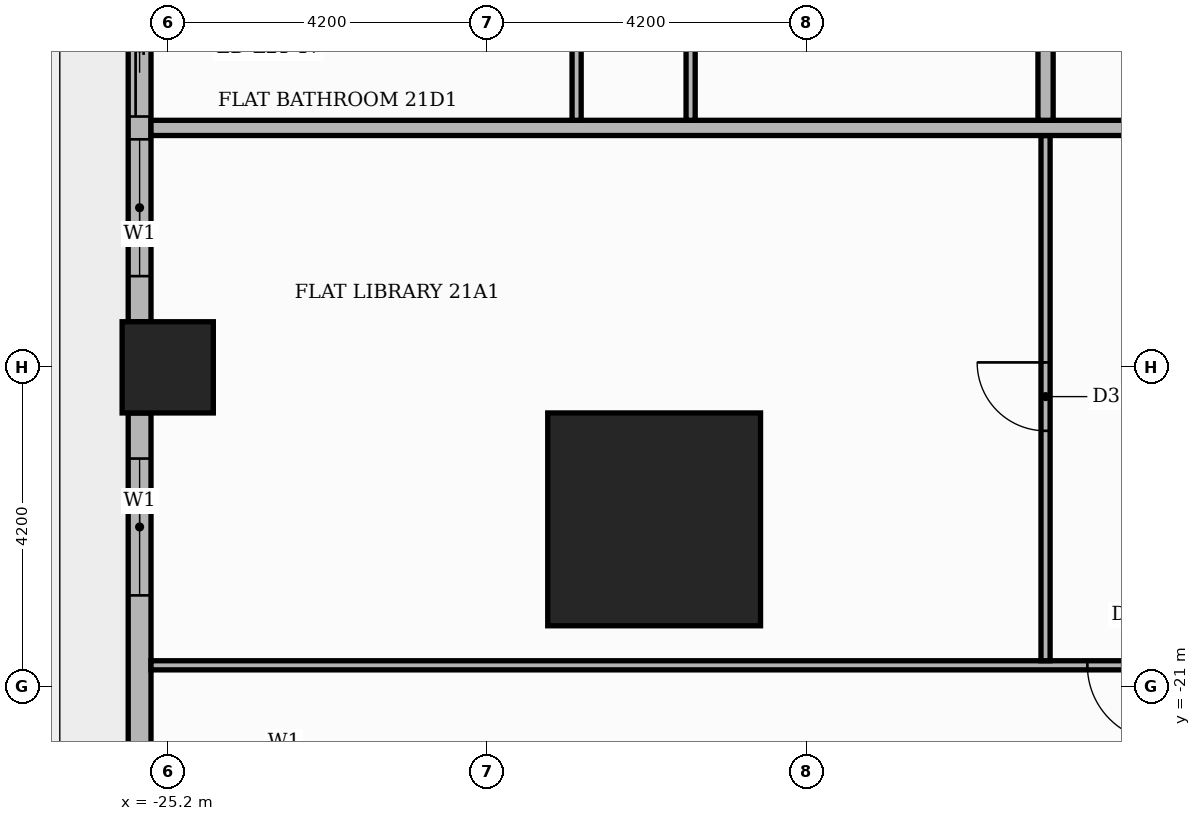
"""IFC4 building model, lengths in metres.
Left out: names, types, materials, properties, quantities, classifications, styles, units other than length and angle.
Written with IfcOpenShell. Run it as: python <this file> out.ifc"""

import sys

from ifc_helpers import new_model, si_unit, direction, frame, frame_2d, origin, origin_2d, place, context, subcontext, project, spatial, rectangle, extrude, element, fill, save


model = new_model("IFC4")
c1 = context("Model", 3, precision=1e-05, world=origin(), true_north=direction((0.0, 1.0)))
c2 = subcontext(c1, "Body", "Model", "MODEL_VIEW")
j1 = project(units=[si_unit("LENGTHUNIT", "METRE"), si_unit("PLANEANGLEUNIT", "RADIAN")], contexts=[c1])
p1 = place(None, origin())
s1 = spatial("IfcSite", under=j1, at=p1, CompositionType="ELEMENT")
p2 = place(p1, origin())
s2 = spatial("IfcBuilding", under=s1, at=p2, CompositionType="ELEMENT")
p3 = place(p2, frame((0.0, 0.0, 90.9)))
s3 = spatial("IfcBuildingStorey", under=s2, at=p3, CompositionType="ELEMENT", Elevation=90.9)
p4 = place(p3, frame((-18.8, -18.8, 0.0), z_axis=(0.0, 0.0, 1.0), x_axis=(1.0, 0.0, 0.0)))
e1 = element("IfcColumn", 1, at=p4, inside=s3, PredefinedType="COLUMN", context=c2, shape_type="SweptSolid", body=[
    extrude(rectangle(XDim=2.8, YDim=2.8, at=origin_2d()), origin(), (0.0, 0.0, 1.0), 3.9),
])
p5 = place(p3, frame((-25.2, -16.8, 0.0), z_axis=(0.0, 0.0, 1.0), x_axis=(1.0, 0.0, 0.0)))
e2 = element("IfcColumn", 2, at=p5, inside=s3, PredefinedType="COLUMN", context=c2, shape_type="SweptSolid", body=[
    extrude(rectangle(XDim=1.2, YDim=1.2, at=origin_2d()), origin(), (0.0, 0.0, 1.0), 3.9),
])
p6 = place(p3, frame((-25.57, -9.0, 0.0), z_axis=(0.0, 0.0, 1.0), x_axis=(0.0, -1.0, 0.0)))
e3 = element("IfcWall", 3, at=p6, inside=s3, PredefinedType="STANDARD", context=c2, shape_type="SweptSolid", body=[
    extrude(rectangle(XDim=7.2, YDim=0.3, at=frame_2d((3.6, 0.0))), origin(), (0.0, 0.0, 1.0), 3.48),
])
p7 = place(p6, frame((0.6, 0.0, 0.9)))
e4 = element("IfcOpeningElement", 4, at=p7, cuts=e3, PredefinedType="OPENING", context=c2, shape_type="SweptSolid", body=[
    extrude(rectangle(XDim=1.8, YDim=2.1, at=frame_2d((0.9, 1.05))), frame((0.0, 0.16, 0.0), z_axis=(0.0, -1.0, 0.0), x_axis=(1.0, 0.0, 0.0)), (0.0, 0.0, 1.0), 0.32),
])
p8 = place(p6, frame((2.7, 0.0, 0.0)))
e5 = element("IfcOpeningElement", 5, at=p8, cuts=e3, PredefinedType="OPENING", context=c2, shape_type="SweptSolid", body=[
    extrude(rectangle(XDim=1.8, YDim=2.4, at=frame_2d((0.9, 1.2))), frame((0.0, 0.16, 0.0), z_axis=(0.0, -1.0, 0.0), x_axis=(1.0, 0.0, 0.0)), (0.0, 0.0, 1.0), 0.32),
])
p9 = place(p6, frame((4.8, 0.0, 0.9)))
e6 = element("IfcOpeningElement", 6, at=p9, cuts=e3, PredefinedType="OPENING", context=c2, shape_type="SweptSolid", body=[
    extrude(rectangle(XDim=1.8, YDim=2.1, at=frame_2d((0.9, 1.05))), frame((0.0, 0.16, 0.0), z_axis=(0.0, -1.0, 0.0), x_axis=(1.0, 0.0, 0.0)), (0.0, 0.0, 1.0), 0.32),
])
p10 = place(p3, frame((-25.57, -17.4, 0.0), z_axis=(0.0, 0.0, 1.0), x_axis=(0.0, -1.0, 0.0)))
e7 = element("IfcWall", 7, at=p10, inside=s3, PredefinedType="STANDARD", context=c2, shape_type="SweptSolid", body=[
    extrude(rectangle(XDim=4.82, YDim=0.3, at=frame_2d((2.41, 0.0))), origin(), (0.0, 0.0, 1.0), 3.48),
])
p11 = place(p10, frame((0.6, 0.0, 0.9)))
e8 = element("IfcOpeningElement", 8, at=p11, cuts=e7, PredefinedType="OPENING", context=c2, shape_type="SweptSolid", body=[
    extrude(rectangle(XDim=1.8, YDim=2.1, at=frame_2d((0.9, 1.05))), frame((0.0, 0.16, 0.0), z_axis=(0.0, -1.0, 0.0), x_axis=(1.0, 0.0, 0.0)), (0.0, 0.0, 1.0), 0.32),
])
p12 = place(p3, frame((-25.42, -20.72, 0.0), z_axis=(0.0, 0.0, 1.0), x_axis=(1.0, 0.0, 0.0)))
e9 = element("IfcWall", 9, at=p12, inside=s3, PredefinedType="PARTITIONING", context=c2, shape_type="SweptSolid", body=[
    extrude(rectangle(XDim=38.97, YDim=0.12, at=frame_2d((19.485, 0.0))), origin(), (0.0, 0.0, 1.0), 3.48),
])
p13 = place(p12, frame((12.32, 0.0, 0.0)))
e10 = element("IfcOpeningElement", 10, at=p13, cuts=e9, PredefinedType="OPENING", context=c2, shape_type="SweptSolid", body=[
    extrude(rectangle(XDim=1.0, YDim=2.1, at=frame_2d((0.5, 1.05))), frame((0.0, 0.07, 0.0), z_axis=(0.0, -1.0, 0.0), x_axis=(1.0, 0.0, 0.0)), (0.0, 0.0, 1.0), 0.14),
])
p14 = place(p12, frame((16.52, 0.0, 0.0)))
e11 = element("IfcOpeningElement", 11, at=p14, cuts=e9, PredefinedType="OPENING", context=c2, shape_type="SweptSolid", body=[
    extrude(rectangle(XDim=1.0, YDim=2.1, at=frame_2d((0.5, 1.05))), frame((0.0, 0.07, 0.0), z_axis=(0.0, -1.0, 0.0), x_axis=(1.0, 0.0, 0.0)), (0.0, 0.0, 1.0), 0.14),
])
p15 = place(p12, frame((23.92, 0.0, 0.0)))
e12 = element("IfcOpeningElement", 12, at=p15, cuts=e9, PredefinedType="OPENING", context=c2, shape_type="SweptSolid", body=[
    extrude(rectangle(XDim=0.9, YDim=2.1, at=frame_2d((0.45, 1.05))), frame((0.0, 0.07, 0.0), z_axis=(0.0, -1.0, 0.0), x_axis=(1.0, 0.0, 0.0)), (0.0, 0.0, 1.0), 0.14),
])
p16 = place(p12, frame((34.42, 0.0, 0.0)))
e13 = element("IfcOpeningElement", 13, at=p16, cuts=e9, PredefinedType="OPENING", context=c2, shape_type="SweptSolid", body=[
    extrude(rectangle(XDim=0.9, YDim=2.1, at=frame_2d((0.45, 1.05))), frame((0.0, 0.07, 0.0), z_axis=(0.0, -1.0, 0.0), x_axis=(1.0, 0.0, 0.0)), (0.0, 0.0, 1.0), 0.14),
])
p17 = place(p3, frame((-13.65, -20.66, 0.0), z_axis=(0.0, 0.0, 1.0), x_axis=(0.0, 1.0, 0.0)))
e14 = element("IfcWall", 14, at=p17, inside=s3, PredefinedType="PARTITIONING", context=c2, shape_type="SweptSolid", body=[
    extrude(rectangle(XDim=6.91, YDim=0.12, at=frame_2d((3.455, 0.0))), origin(), (0.0, 0.0, 1.0), 3.48),
])
p18 = place(p17, frame((3.025, 0.0, 0.0)))
e15 = element("IfcOpeningElement", 15, at=p18, cuts=e14, PredefinedType="OPENING", context=c2, shape_type="SweptSolid", body=[
    extrude(rectangle(XDim=0.9, YDim=2.1, at=frame_2d((0.45, 1.05))), frame((0.0, 0.07, 0.0), z_axis=(0.0, -1.0, 0.0), x_axis=(1.0, 0.0, 0.0)), (0.0, 0.0, 1.0), 0.14),
])
p19 = place(p3, frame((-25.42, -13.65, 0.0), z_axis=(0.0, 0.0, 1.0), x_axis=(1.0, 0.0, 0.0)))
e16 = element("IfcWall", 16, at=p19, inside=s3, PredefinedType="PARTITIONING", context=c2, shape_type="SweptSolid", body=[
    extrude(rectangle(XDim=39.07, YDim=0.2, at=frame_2d((19.535, 0.0))), origin(), (0.0, 0.0, 1.0), 3.48),
])
p20 = place(p19, frame((14.37, 0.0, 0.0)))
e17 = element("IfcOpeningElement", 17, at=p20, cuts=e16, PredefinedType="OPENING", context=c2, shape_type="SweptSolid", body=[
    extrude(rectangle(XDim=1.1, YDim=2.4, at=frame_2d((0.55, 1.2))), frame((0.0, 0.11, 0.0), z_axis=(0.0, -1.0, 0.0), x_axis=(1.0, 0.0, 0.0)), (0.0, 0.0, 1.0), 0.22),
])
p21 = place(p3, frame((-19.82, -13.55, 0.0), z_axis=(0.0, 0.0, 1.0), x_axis=(0.0, 1.0, 0.0)))
e18 = element("IfcWall", 18, at=p21, inside=s3, PredefinedType="PARTITIONING", context=c2, shape_type="SweptSolid", body=[
    extrude(rectangle(XDim=1.94, YDim=0.12, at=frame_2d((0.97, 0.0))), origin(), (0.0, 0.0, 1.0), 3.48),
])
p22 = place(p3, frame((-18.32, -13.55, 0.0), z_axis=(0.0, 0.0, 1.0), x_axis=(0.0, 1.0, 0.0)))
e19 = element("IfcWall", 19, at=p22, inside=s3, PredefinedType="PARTITIONING", context=c2, shape_type="SweptSolid", body=[
    extrude(rectangle(XDim=4.34, YDim=0.12, at=frame_2d((2.17, 0.0))), origin(), (0.0, 0.0, 1.0), 3.48),
])
p23 = place(p22, frame((1.7, 0.0, 0.0)))
e20 = element("IfcOpeningElement", 20, at=p23, cuts=e19, PredefinedType="OPENING", context=c2, shape_type="SweptSolid", body=[
    extrude(rectangle(XDim=0.9, YDim=2.1, at=frame_2d((0.45, 1.05))), frame((0.0, 0.07, 0.0), z_axis=(0.0, -1.0, 0.0), x_axis=(1.0, 0.0, 0.0)), (0.0, 0.0, 1.0), 0.14),
])
p24 = place(p3, frame((-13.65, -13.55, 0.0), z_axis=(0.0, 0.0, 1.0), x_axis=(0.0, 1.0, 0.0)))
e21 = element("IfcWall", 21, at=p24, inside=s3, PredefinedType="PARTITIONING", context=c2, shape_type="SweptSolid", body=[
    extrude(rectangle(XDim=27.1, YDim=0.2, at=frame_2d((13.55, 0.0))), origin(), (0.0, 0.0, 1.0), 3.48),
])
p25 = place(p24, frame((24.55, 0.0, 0.0)))
e22 = element("IfcOpeningElement", 22, at=p25, cuts=e21, PredefinedType="OPENING", context=c2, shape_type="SweptSolid", body=[
    extrude(rectangle(XDim=1.1, YDim=2.4, at=frame_2d((0.55, 1.2))), frame((0.0, 0.11, 0.0), z_axis=(0.0, -1.0, 0.0), x_axis=(1.0, 0.0, 0.0)), (0.0, 0.0, 1.0), 0.22),
])
p26 = place(p8, origin())
e23 = element("IfcDoor", 23, at=p26, inside=s3, OperationType="SLIDING_TO_RIGHT", PredefinedType="DOOR", context=c2, shape_type="SweptSolid", body=[
    extrude(rectangle(XDim=1.8, YDim=2.4, at=frame_2d((0.9, 1.2))), frame((0.0, 0.025, 0.0), z_axis=(0.0, -1.0, 0.0), x_axis=(1.0, 0.0, 0.0)), (0.0, 0.0, 1.0), 0.05),
])
fill(e5, e23)
p27 = place(p9, origin())
e24 = element("IfcWindow", 24, at=p27, inside=s3, PartitioningType="SINGLE_PANEL", PredefinedType="WINDOW", context=c2, shape_type="SweptSolid", body=[
    extrude(rectangle(XDim=1.8, YDim=2.1, at=frame_2d((0.9, 1.05))), frame((0.0, 0.03, 0.0), z_axis=(0.0, -1.0, 0.0), x_axis=(1.0, 0.0, 0.0)), (0.0, 0.0, 1.0), 0.06),
])
fill(e6, e24)
p28 = place(p11, origin())
e25 = element("IfcWindow", 25, at=p28, inside=s3, PartitioningType="SINGLE_PANEL", PredefinedType="WINDOW", context=c2, shape_type="SweptSolid", body=[
    extrude(rectangle(XDim=1.8, YDim=2.1, at=frame_2d((0.9, 1.05))), frame((0.0, 0.03, 0.0), z_axis=(0.0, -1.0, 0.0), x_axis=(1.0, 0.0, 0.0)), (0.0, 0.0, 1.0), 0.06),
])
fill(e8, e25)
p29 = place(p18, origin())
e26 = element("IfcDoor", 26, at=p29, inside=s3, OperationType="SINGLE_SWING_RIGHT", PredefinedType="DOOR", context=c2, shape_type="SweptSolid", body=[
    extrude(rectangle(XDim=0.9, YDim=2.1, at=frame_2d((0.45, 1.05))), frame((0.0, 0.025, 0.0), z_axis=(0.0, -1.0, 0.0), x_axis=(1.0, 0.0, 0.0)), (0.0, 0.0, 1.0), 0.05),
])
fill(e15, e26)
p30 = place(p13, frame((1.0, 0.0, 0.0), z_axis=(0.0, 0.0, 1.0), x_axis=(-1.0, 0.0, 0.0)))
e27 = element("IfcDoor", 27, at=p30, inside=s3, OperationType="SINGLE_SWING_RIGHT", PredefinedType="DOOR", context=c2, shape_type="SweptSolid", body=[
    extrude(rectangle(XDim=1.0, YDim=2.1, at=frame_2d((0.5, 1.05))), frame((0.0, 0.025, 0.0), z_axis=(0.0, -1.0, 0.0), x_axis=(1.0, 0.0, 0.0)), (0.0, 0.0, 1.0), 0.05),
])
fill(e10, e27)
save(model, sys.argv[1])
